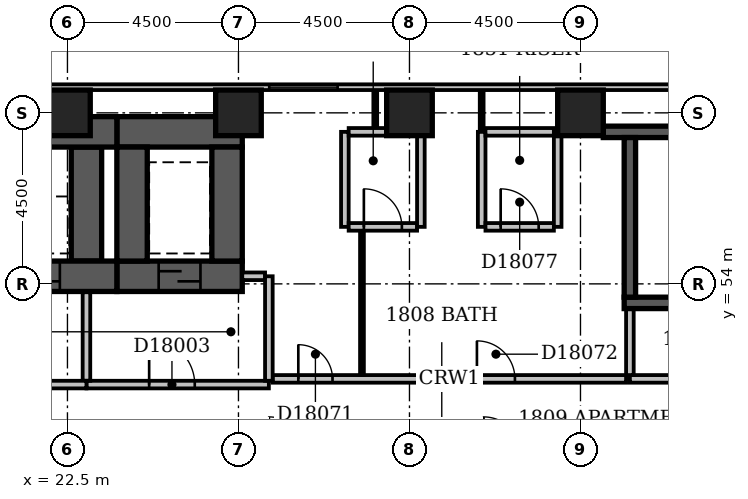
"""IFC4 building model, lengths in metres.
Left out: names, types, materials, properties, quantities, classifications, styles, units other than length and angle.
Written with IfcOpenShell. Run it as: python <this file> out.ifc"""

import sys

from ifc_helpers import new_model, si_unit, direction, frame, frame_2d, origin, origin_2d, place, context, subcontext, project, spatial, rectangle, extrude, element, fill, save


model = new_model("IFC4")
c1 = context("Model", 3, precision=1e-05, world=origin(), true_north=direction((0.0, 1.0)))
c2 = subcontext(c1, "Body", "Model", "MODEL_VIEW")
j1 = project(units=[si_unit("LENGTHUNIT", "METRE"), si_unit("PLANEANGLEUNIT", "RADIAN")], contexts=[c1])
p1 = place(None, origin())
s1 = spatial("IfcSite", under=j1, at=p1, CompositionType="ELEMENT")
p2 = place(p1, origin())
s2 = spatial("IfcBuilding", under=s1, at=p2, CompositionType="ELEMENT")
p3 = place(p2, frame((0.0, 0.0, 75.8)))
s3 = spatial("IfcBuildingStorey", under=s2, at=p3, CompositionType="ELEMENT", Elevation=75.8)
p4 = place(p3, frame((7.35, 54.2, -0.3), z_axis=(0.0, 0.0, 1.0), x_axis=(1.0, 0.0, 0.0)))
e1 = element("IfcWall", 1, at=p4, inside=s3, PredefinedType="SHEAR", context=c2, shape_type="SweptSolid", body=[
    extrude(rectangle(XDim=16.45, YDim=0.8, at=frame_2d((8.225, 0.0))), origin(), (0.0, 0.0, 1.0), 3.6),
])
p5 = place(p4, frame((1.35, 0.0, 0.3)))
e2 = element("IfcOpeningElement", 2, at=p5, cuts=e1, PredefinedType="OPENING", context=c2, shape_type="SweptSolid", body=[
    extrude(rectangle(XDim=1.1, YDim=2.1, at=frame_2d((0.55, 1.05))), frame((0.0, 0.412, 0.0), z_axis=(0.0, -1.0, 0.0), x_axis=(1.0, 0.0, 0.0)), (0.0, 0.0, 1.0), 0.824),
])
p6 = place(p4, frame((3.85, 0.0, 0.3)))
e3 = element("IfcOpeningElement", 3, at=p6, cuts=e1, PredefinedType="OPENING", context=c2, shape_type="SweptSolid", body=[
    extrude(rectangle(XDim=1.1, YDim=2.1, at=frame_2d((0.55, 1.05))), frame((0.0, 0.412, 0.0), z_axis=(0.0, -1.0, 0.0), x_axis=(1.0, 0.0, 0.0)), (0.0, 0.0, 1.0), 0.824),
])
p7 = place(p4, frame((6.35, 0.0, 0.3)))
e4 = element("IfcOpeningElement", 4, at=p7, cuts=e1, PredefinedType="OPENING", context=c2, shape_type="SweptSolid", body=[
    extrude(rectangle(XDim=1.1, YDim=2.1, at=frame_2d((0.55, 1.05))), frame((0.0, 0.412, 0.0), z_axis=(0.0, -1.0, 0.0), x_axis=(1.0, 0.0, 0.0)), (0.0, 0.0, 1.0), 0.824),
])
p8 = place(p4, frame((8.85, 0.0, 0.3)))
e5 = element("IfcOpeningElement", 5, at=p8, cuts=e1, PredefinedType="OPENING", context=c2, shape_type="SweptSolid", body=[
    extrude(rectangle(XDim=1.1, YDim=2.1, at=frame_2d((0.55, 1.05))), frame((0.0, 0.412, 0.0), z_axis=(0.0, -1.0, 0.0), x_axis=(1.0, 0.0, 0.0)), (0.0, 0.0, 1.0), 0.824),
])
p9 = place(p4, frame((11.35, 0.0, 0.3)))
e6 = element("IfcOpeningElement", 6, at=p9, cuts=e1, PredefinedType="OPENING", context=c2, shape_type="SweptSolid", body=[
    extrude(rectangle(XDim=1.1, YDim=2.1, at=frame_2d((0.55, 1.05))), frame((0.0, 0.412, 0.0), z_axis=(0.0, -1.0, 0.0), x_axis=(1.0, 0.0, 0.0)), (0.0, 0.0, 1.0), 0.824),
])
p10 = place(p4, frame((13.85, 0.0, 0.3)))
e7 = element("IfcOpeningElement", 7, at=p10, cuts=e1, PredefinedType="OPENING", context=c2, shape_type="SweptSolid", body=[
    extrude(rectangle(XDim=1.1, YDim=2.1, at=frame_2d((0.55, 1.05))), frame((0.0, 0.412, 0.0), z_axis=(0.0, -1.0, 0.0), x_axis=(1.0, 0.0, 0.0)), (0.0, 0.0, 1.0), 0.824),
])
p11 = place(p3, frame((7.35, 58.0, -0.3), z_axis=(0.0, 0.0, 1.0), x_axis=(1.0, 0.0, 0.0)))
e8 = element("IfcWall", 8, at=p11, inside=s3, PredefinedType="SHEAR", context=c2, shape_type="SweptSolid", body=[
    extrude(rectangle(XDim=16.45, YDim=0.8, at=frame_2d((8.225, 0.0))), origin(), (0.0, 0.0, 1.0), 3.6),
])
p12 = place(p3, frame((23.0, 54.6, -0.3), z_axis=(0.0, 0.0, 1.0), x_axis=(0.0, 1.0, 0.0)))
e9 = element("IfcWall", 9, at=p12, inside=s3, PredefinedType="SHEAR", context=c2, shape_type="SweptSolid", body=[
    extrude(rectangle(XDim=3.0, YDim=0.8, at=frame_2d((1.5, 0.0))), origin(), (0.0, 0.0, 1.0), 3.6),
])
p13 = place(p3, frame((23.8, 54.2, -0.3), z_axis=(0.0, 0.0, 1.0), x_axis=(1.0, 0.0, 0.0)))
e10 = element("IfcWall", 10, at=p13, inside=s3, PredefinedType="SHEAR", context=c2, shape_type="SweptSolid", body=[
    extrude(rectangle(XDim=3.3, YDim=0.8, at=frame_2d((1.65, 0.0))), origin(), (0.0, 0.0, 1.0), 3.6),
])
p14 = place(p13, frame((1.1, 0.0, 0.3)))
e11 = element("IfcOpeningElement", 11, at=p14, cuts=e10, PredefinedType="OPENING", context=c2, shape_type="SweptSolid", body=[
    extrude(rectangle(XDim=1.1, YDim=2.1, at=frame_2d((0.55, 1.05))), frame((0.0, 0.412, 0.0), z_axis=(0.0, -1.0, 0.0), x_axis=(1.0, 0.0, 0.0)), (0.0, 0.0, 1.0), 0.824),
])
p15 = place(p3, frame((23.8, 58.0, -0.3), z_axis=(0.0, 0.0, 1.0), x_axis=(1.0, 0.0, 0.0)))
e12 = element("IfcWall", 12, at=p15, inside=s3, PredefinedType="SHEAR", context=c2, shape_type="SweptSolid", body=[
    extrude(rectangle(XDim=3.3, YDim=0.8, at=frame_2d((1.65, 0.0))), origin(), (0.0, 0.0, 1.0), 3.6),
])
for number, where, z_axis, x_axis in (
    (13, (24.2, 54.6, -0.3), (0.0, 0.0, 1.0), (0.0, 1.0, 0.0)),
    (14, (26.7, 54.6, -0.3), (0.0, 0.0, 1.0), (0.0, 1.0, 0.0)),
):
    element("IfcWall", number, at=place(p3, frame(where, z_axis=z_axis, x_axis=x_axis)), inside=s3, PredefinedType="SHEAR", context=c2, shape_type="SweptSolid", body=[
        extrude(rectangle(XDim=3.0, YDim=0.8, at=frame_2d((1.5, 0.0))), origin(), (0.0, 0.0, 1.0), 3.6),
    ])
p16 = place(p3, frame((36.6, 58.0, -0.3), z_axis=(0.0, 0.0, 1.0), x_axis=(1.0, 0.0, 0.0)))
e15 = element("IfcWall", 15, at=p16, inside=s3, PredefinedType="SHEAR", context=c2, shape_type="SweptSolid", body=[
    extrude(rectangle(XDim=7.8, YDim=0.3, at=frame_2d((3.9, 0.0))), origin(), (0.0, 0.0, 1.0), 3.6),
])
p17 = place(p3, frame((37.15, 53.5, -0.3), z_axis=(0.0, 0.0, 1.0), x_axis=(1.0, 0.0, 0.0)))
e16 = element("IfcWall", 16, at=p17, inside=s3, PredefinedType="SHEAR", context=c2, shape_type="SweptSolid", body=[
    extrude(rectangle(XDim=7.0, YDim=0.3, at=frame_2d((3.5, 0.0))), origin(), (0.0, 0.0, 1.0), 3.6),
])
p18 = place(p17, frame((5.58, 0.0, 0.3)))
e17 = element("IfcOpeningElement", 17, at=p18, cuts=e16, PredefinedType="OPENING", context=c2, shape_type="SweptSolid", body=[
    extrude(rectangle(XDim=1.1, YDim=2.1, at=frame_2d((0.55, 1.05))), frame((0.0, 0.162, 0.0), z_axis=(0.0, -1.0, 0.0), x_axis=(1.0, 0.0, 0.0)), (0.0, 0.0, 1.0), 0.324),
])
p19 = place(p3, frame((37.3, 53.65, -0.3), z_axis=(0.0, 0.0, 1.0), x_axis=(0.0, 1.0, 0.0)))
e18 = element("IfcWall", 18, at=p19, inside=s3, PredefinedType="SHEAR", context=c2, shape_type="SweptSolid", body=[
    extrude(rectangle(XDim=4.2, YDim=0.3, at=frame_2d((2.1, 0.0))), origin(), (0.0, 0.0, 1.0), 3.6),
])
for number, where, z_axis, x_axis in (
    (19, (22.5, 58.5, -0.3), (0.0, 0.0, 1.0), (1.0, 0.0, 0.0)),
    (20, (27.0, 58.5, -0.3), (0.0, 0.0, 1.0), (1.0, 0.0, 0.0)),
    (21, (31.5, 58.5, -0.3), (0.0, 0.0, 1.0), (1.0, 0.0, 0.0)),
    (22, (36.0, 58.5, -0.3), (0.0, 0.0, 1.0), (1.0, 0.0, 0.0)),
):
    element("IfcColumn", number, at=place(p3, frame(where, z_axis=z_axis, x_axis=x_axis)), inside=s3, PredefinedType="COLUMN", context=c2, shape_type="SweptSolid", body=[
        extrude(rectangle(XDim=1.2, YDim=1.2, at=origin_2d()), origin(), (0.0, 0.0, 1.0), 3.6),
    ])
p20 = place(p3, frame((68.1, 59.175, 0.0), z_axis=(0.0, 0.0, 1.0), x_axis=(-1.0, 0.0, 0.0)))
e23 = element("IfcWall", 23, at=p20, inside=s3, PredefinedType="STANDARD", context=c2, shape_type="SweptSolid", body=[
    extrude(rectangle(XDim=68.85, YDim=0.15, at=frame_2d((34.425, 0.0))), origin(), (0.0, 0.0, 1.0), 2.7),
])
p21 = place(p20, frame((1.65, 0.0, 0.6)))
e24 = element("IfcOpeningElement", 24, at=p21, cuts=e23, PredefinedType="OPENING", context=c2, shape_type="SweptSolid", body=[
    extrude(rectangle(XDim=2.4, YDim=1.8, at=frame_2d((1.2, 0.9))), frame((0.0, 0.087, 0.0), z_axis=(0.0, -1.0, 0.0), x_axis=(1.0, 0.0, 0.0)), (0.0, 0.0, 1.0), 0.174),
])
p22 = place(p20, frame((6.15, 0.0, 0.6)))
e25 = element("IfcOpeningElement", 25, at=p22, cuts=e23, PredefinedType="OPENING", context=c2, shape_type="SweptSolid", body=[
    extrude(rectangle(XDim=2.4, YDim=1.8, at=frame_2d((1.2, 0.9))), frame((0.0, 0.087, 0.0), z_axis=(0.0, -1.0, 0.0), x_axis=(1.0, 0.0, 0.0)), (0.0, 0.0, 1.0), 0.174),
])
p23 = place(p20, frame((38.49, 0.0, 0.6)))
e26 = element("IfcOpeningElement", 26, at=p23, cuts=e23, PredefinedType="OPENING", context=c2, shape_type="SweptSolid", body=[
    extrude(rectangle(XDim=1.8, YDim=1.8, at=frame_2d((0.9, 0.9))), frame((0.0, 0.087, 0.0), z_axis=(0.0, -1.0, 0.0), x_axis=(1.0, 0.0, 0.0)), (0.0, 0.0, 1.0), 0.174),
])
p24 = place(p3, frame((8.0, 51.35, 0.0), z_axis=(0.0, 0.0, 1.0), x_axis=(1.0, 0.0, 0.0)))
e27 = element("IfcWall", 27, at=p24, inside=s3, PredefinedType="PARTITIONING", context=c2, shape_type="SweptSolid", body=[
    extrude(rectangle(XDim=15.0, YDim=0.2, at=frame_2d((7.5, 0.0))), origin(), (0.0, 0.0, 1.0), 3.3),
])
p25 = place(p24, frame((3.4, 0.0, 0.0)))
e28 = element("IfcOpeningElement", 28, at=p25, cuts=e27, PredefinedType="OPENING", context=c2, shape_type="SweptSolid", body=[
    extrude(rectangle(XDim=1.2, YDim=2.1, at=frame_2d((0.6, 1.05))), frame((0.0, 0.112, 0.0), z_axis=(0.0, -1.0, 0.0), x_axis=(1.0, 0.0, 0.0)), (0.0, 0.0, 1.0), 0.224),
])
p26 = place(p24, frame((9.4, 0.0, 0.0)))
e29 = element("IfcOpeningElement", 29, at=p26, cuts=e27, PredefinedType="OPENING", context=c2, shape_type="SweptSolid", body=[
    extrude(rectangle(XDim=1.2, YDim=2.1, at=frame_2d((0.6, 1.05))), frame((0.0, 0.112, 0.0), z_axis=(0.0, -1.0, 0.0), x_axis=(1.0, 0.0, 0.0)), (0.0, 0.0, 1.0), 0.224),
])
p27 = place(p3, frame((23.0, 51.45, 0.0), z_axis=(0.0, 0.0, 1.0), x_axis=(0.0, 1.0, 0.0)))
e30 = element("IfcWall", 30, at=p27, inside=s3, PredefinedType="PARTITIONING", context=c2, shape_type="SweptSolid", body=[
    extrude(rectangle(XDim=2.33, YDim=0.2, at=frame_2d((1.165, 0.0))), origin(), (0.0, 0.0, 1.0), 3.3),
])
p28 = place(p3, frame((23.0, 51.35, 0.0), z_axis=(0.0, 0.0, 1.0), x_axis=(1.0, 0.0, 0.0)))
e31 = element("IfcWall", 31, at=p28, inside=s3, PredefinedType="PARTITIONING", context=c2, shape_type="SweptSolid", body=[
    extrude(rectangle(XDim=4.8, YDim=0.2, at=frame_2d((2.4, 0.0))), origin(), (0.0, 0.0, 1.0), 3.3),
])
p29 = place(p28, frame((1.65, 0.0, 0.0)))
e32 = element("IfcOpeningElement", 32, at=p29, cuts=e31, PredefinedType="OPENING", context=c2, shape_type="SweptSolid", body=[
    extrude(rectangle(XDim=1.2, YDim=2.1, at=frame_2d((0.6, 1.05))), frame((0.0, 0.112, 0.0), z_axis=(0.0, -1.0, 0.0), x_axis=(1.0, 0.0, 0.0)), (0.0, 0.0, 1.0), 0.224),
])
p30 = place(p3, frame((27.8, 51.45, 0.0), z_axis=(0.0, 0.0, 1.0), x_axis=(0.0, 1.0, 0.0)))
e33 = element("IfcWall", 33, at=p30, inside=s3, PredefinedType="PARTITIONING", context=c2, shape_type="SweptSolid", body=[
    extrude(rectangle(XDim=2.75, YDim=0.2, at=frame_2d((1.375, 0.0))), origin(), (0.0, 0.0, 1.0), 3.3),
])
p31 = place(p3, frame((27.1, 54.2, 0.0), z_axis=(0.0, 0.0, 1.0), x_axis=(1.0, 0.0, 0.0)))
e34 = element("IfcWall", 34, at=p31, inside=s3, PredefinedType="PARTITIONING", context=c2, shape_type="SweptSolid", body=[
    extrude(rectangle(XDim=0.6, YDim=0.2, at=frame_2d((0.3, 0.0))), origin(), (0.0, 0.0, 1.0), 3.3),
])
p32 = place(p3, frame((37.3, 51.5, 0.0), z_axis=(0.0, 0.0, 1.0), x_axis=(1.0, 0.0, 0.0)))
e35 = element("IfcWall", 35, at=p32, inside=s3, PredefinedType="PARTITIONING", context=c2, shape_type="SweptSolid", body=[
    extrude(rectangle(XDim=6.7, YDim=0.2, at=frame_2d((3.35, 0.0))), origin(), (0.0, 0.0, 1.0), 3.3),
])
p33 = place(p32, frame((2.75, 0.0, 0.0)))
e36 = element("IfcOpeningElement", 36, at=p33, cuts=e35, PredefinedType="OPENING", context=c2, shape_type="SweptSolid", body=[
    extrude(rectangle(XDim=1.2, YDim=2.1, at=frame_2d((0.6, 1.05))), frame((0.0, 0.112, 0.0), z_axis=(0.0, -1.0, 0.0), x_axis=(1.0, 0.0, 0.0)), (0.0, 0.0, 1.0), 0.224),
])
p34 = place(p3, frame((37.3, 51.6, 0.0), z_axis=(0.0, 0.0, 1.0), x_axis=(0.0, 1.0, 0.0)))
e37 = element("IfcWall", 37, at=p34, inside=s3, PredefinedType="PARTITIONING", context=c2, shape_type="SweptSolid", body=[
    extrude(rectangle(XDim=1.73, YDim=0.2, at=frame_2d((0.865, 0.0))), origin(), (0.0, 0.0, 1.0), 3.3),
])
p35 = place(p3, frame((27.9, 51.5, 0.0), z_axis=(0.0, 0.0, 1.0), x_axis=(1.0, 0.0, 0.0)))
e38 = element("IfcWall", 38, at=p35, inside=s3, PredefinedType="PARTITIONING", context=c2, shape_type="SweptSolid", body=[
    extrude(rectangle(XDim=9.3, YDim=0.2, at=frame_2d((4.65, 0.0))), origin(), (0.0, 0.0, 1.0), 3.3),
])
p36 = place(p35, frame((0.675, 0.0, 0.0)))
e39 = element("IfcOpeningElement", 39, at=p36, cuts=e38, PredefinedType="OPENING", context=c2, shape_type="SweptSolid", body=[
    extrude(rectangle(XDim=0.9, YDim=2.1, at=frame_2d((0.45, 1.05))), frame((0.0, 0.112, 0.0), z_axis=(0.0, -1.0, 0.0), x_axis=(1.0, 0.0, 0.0)), (0.0, 0.0, 1.0), 0.224),
])
p37 = place(p35, frame((5.375, 0.0, 0.0)))
e40 = element("IfcOpeningElement", 40, at=p37, cuts=e38, PredefinedType="OPENING", context=c2, shape_type="SweptSolid", body=[
    extrude(rectangle(XDim=1.0, YDim=2.1, at=frame_2d((0.5, 1.05))), frame((0.0, 0.112, 0.0), z_axis=(0.0, -1.0, 0.0), x_axis=(1.0, 0.0, 0.0)), (0.0, 0.0, 1.0), 0.224),
])
p38 = place(p3, frame((30.25, 51.6, 0.0), z_axis=(0.0, 0.0, 1.0), x_axis=(0.0, 1.0, 0.0)))
e41 = element("IfcWall", 41, at=p38, inside=s3, PredefinedType="PARTITIONING", context=c2, shape_type="SweptSolid", body=[
    extrude(rectangle(XDim=3.8, YDim=0.1, at=frame_2d((1.9, 0.0))), origin(), (0.0, 0.0, 1.0), 3.3),
])
p39 = place(p3, frame((29.8, 55.5, 0.0), z_axis=(0.0, 0.0, 1.0), x_axis=(0.0, 1.0, 0.0)))
e42 = element("IfcWall", 42, at=p39, inside=s3, PredefinedType="PARTITIONING", context=c2, shape_type="SweptSolid", body=[
    extrude(rectangle(XDim=2.5, YDim=0.2, at=frame_2d((1.25, 0.0))), origin(), (0.0, 0.0, 1.0), 3.3),
])
p40 = place(p3, frame((29.9, 55.5, 0.0), z_axis=(0.0, 0.0, 1.0), x_axis=(1.0, 0.0, 0.0)))
e43 = element("IfcWall", 43, at=p40, inside=s3, PredefinedType="PARTITIONING", context=c2, shape_type="SweptSolid", body=[
    extrude(rectangle(XDim=1.8, YDim=0.2, at=frame_2d((0.9, 0.0))), origin(), (0.0, 0.0, 1.0), 3.3),
])
p41 = place(p40, frame((0.4, 0.0, 0.0)))
e44 = element("IfcOpeningElement", 44, at=p41, cuts=e43, PredefinedType="OPENING", context=c2, shape_type="SweptSolid", body=[
    extrude(rectangle(XDim=1.0, YDim=2.1, at=frame_2d((0.5, 1.05))), frame((0.0, 0.112, 0.0), z_axis=(0.0, -1.0, 0.0), x_axis=(1.0, 0.0, 0.0)), (0.0, 0.0, 1.0), 0.224),
])
for number, where, z_axis, x_axis in (
    (45, (31.8, 55.5, 0.0), (0.0, 0.0, 1.0), (0.0, 1.0, 0.0)),
    (46, (33.4, 55.5, 0.0), (0.0, 0.0, 1.0), (0.0, 1.0, 0.0)),
):
    element("IfcWall", number, at=place(p3, frame(where, z_axis=z_axis, x_axis=x_axis)), inside=s3, PredefinedType="PARTITIONING", context=c2, shape_type="SweptSolid", body=[
        extrude(rectangle(XDim=2.5, YDim=0.2, at=frame_2d((1.25, 0.0))), origin(), (0.0, 0.0, 1.0), 3.3),
    ])
p42 = place(p3, frame((33.5, 55.5, 0.0), z_axis=(0.0, 0.0, 1.0), x_axis=(1.0, 0.0, 0.0)))
e47 = element("IfcWall", 47, at=p42, inside=s3, PredefinedType="PARTITIONING", context=c2, shape_type="SweptSolid", body=[
    extrude(rectangle(XDim=1.8, YDim=0.2, at=frame_2d((0.9, 0.0))), origin(), (0.0, 0.0, 1.0), 3.3),
])
p43 = place(p42, frame((0.4, 0.0, 0.0)))
e48 = element("IfcOpeningElement", 48, at=p43, cuts=e47, PredefinedType="OPENING", context=c2, shape_type="SweptSolid", body=[
    extrude(rectangle(XDim=1.0, YDim=2.1, at=frame_2d((0.5, 1.05))), frame((0.0, 0.112, 0.0), z_axis=(0.0, -1.0, 0.0), x_axis=(1.0, 0.0, 0.0)), (0.0, 0.0, 1.0), 0.224),
])
p44 = place(p3, frame((35.4, 55.5, 0.0), z_axis=(0.0, 0.0, 1.0), x_axis=(0.0, 1.0, 0.0)))
e49 = element("IfcWall", 49, at=p44, inside=s3, PredefinedType="PARTITIONING", context=c2, shape_type="SweptSolid", body=[
    extrude(rectangle(XDim=2.5, YDim=0.2, at=frame_2d((1.25, 0.0))), origin(), (0.0, 0.0, 1.0), 2.4),
])
p45 = place(p3, frame((29.9, 58.0, 0.0), z_axis=(0.0, 0.0, 1.0), x_axis=(1.0, 0.0, 0.0)))
e50 = element("IfcWall", 50, at=p45, inside=s3, PredefinedType="PARTITIONING", context=c2, shape_type="SweptSolid", body=[
    extrude(rectangle(XDim=1.8, YDim=0.2, at=frame_2d((0.9, 0.0))), origin(), (0.0, 0.0, 1.0), 3.3),
])
p46 = place(p3, frame((33.4, 58.0, 0.0), z_axis=(0.0, 0.0, 1.0), x_axis=(0.0, 1.0, 0.0)))
e51 = element("IfcWall", 51, at=p46, inside=s3, PredefinedType="PARTITIONING", context=c2, shape_type="SweptSolid", body=[
    extrude(rectangle(XDim=1.1, YDim=0.1, at=frame_2d((0.55, 0.0))), origin(), (0.0, 0.0, 1.0), 3.3),
])
p47 = place(p3, frame((33.5, 58.0, 0.0), z_axis=(0.0, 0.0, 1.0), x_axis=(1.0, 0.0, 0.0)))
e52 = element("IfcWall", 52, at=p47, inside=s3, PredefinedType="PARTITIONING", context=c2, shape_type="SweptSolid", body=[
    extrude(rectangle(XDim=1.8, YDim=0.2, at=frame_2d((0.9, 0.0))), origin(), (0.0, 0.0, 1.0), 3.3),
])
p48 = place(p3, frame((30.6, 58.1, 0.0), z_axis=(0.0, 0.0, 1.0), x_axis=(0.0, 1.0, 0.0)))
e53 = element("IfcWall", 53, at=p48, inside=s3, PredefinedType="PARTITIONING", context=c2, shape_type="SweptSolid", body=[
    extrude(rectangle(XDim=1.0, YDim=0.1, at=frame_2d((0.5, 0.0))), origin(), (0.0, 0.0, 1.0), 3.3),
])
p49 = place(p23, origin())
e54 = element("IfcWindow", 54, at=p49, inside=s3, PartitioningType="SINGLE_PANEL", PredefinedType="WINDOW", context=c2, shape_type="SweptSolid", body=[
    extrude(rectangle(XDim=1.8, YDim=1.8, at=frame_2d((0.9, 0.9))), frame((0.0, 0.03, 0.0), z_axis=(0.0, -1.0, 0.0), x_axis=(1.0, 0.0, 0.0)), (0.0, 0.0, 1.0), 0.06),
])
fill(e26, e54)
p50 = place(p29, origin())
e55 = element("IfcDoor", 55, at=p50, inside=s3, OperationType="SINGLE_SWING_LEFT", PredefinedType="DOOR", context=c2, shape_type="SweptSolid", body=[
    extrude(rectangle(XDim=1.2, YDim=2.1, at=frame_2d((0.6, 1.05))), frame((0.0, 0.025, 0.0), z_axis=(0.0, -1.0, 0.0), x_axis=(1.0, 0.0, 0.0)), (0.0, 0.0, 1.0), 0.05),
])
fill(e32, e55)
p51 = place(p14, origin())
e56 = element("IfcDoor", 56, at=p51, inside=s3, OperationType="SLIDING_TO_LEFT", PredefinedType="DOOR", context=c2, shape_type="SweptSolid", body=[
    extrude(rectangle(XDim=1.1, YDim=2.1, at=frame_2d((0.55, 1.05))), frame((0.0, 0.025, 0.0), z_axis=(0.0, -1.0, 0.0), x_axis=(1.0, 0.0, 0.0)), (0.0, 0.0, 1.0), 0.05),
])
fill(e11, e56)
p52 = place(p10, origin())
e57 = element("IfcDoor", 57, at=p52, inside=s3, OperationType="SLIDING_TO_LEFT", PredefinedType="DOOR", context=c2, shape_type="SweptSolid", body=[
    extrude(rectangle(XDim=1.1, YDim=2.1, at=frame_2d((0.55, 1.05))), frame((0.0, 0.025, 0.0), z_axis=(0.0, -1.0, 0.0), x_axis=(1.0, 0.0, 0.0)), (0.0, 0.0, 1.0), 0.05),
])
fill(e7, e57)
p53 = place(p36, origin())
e58 = element("IfcDoor", 58, at=p53, inside=s3, OperationType="SINGLE_SWING_LEFT", PredefinedType="DOOR", context=c2, shape_type="SweptSolid", body=[
    extrude(rectangle(XDim=0.9, YDim=2.1, at=frame_2d((0.45, 1.05))), frame((0.0, 0.025, 0.0), z_axis=(0.0, -1.0, 0.0), x_axis=(1.0, 0.0, 0.0)), (0.0, 0.0, 1.0), 0.05),
])
fill(e39, e58)
p54 = place(p37, origin())
e59 = element("IfcDoor", 59, at=p54, inside=s3, OperationType="SINGLE_SWING_LEFT", PredefinedType="DOOR", context=c2, shape_type="SweptSolid", body=[
    extrude(rectangle(XDim=1.0, YDim=2.1, at=frame_2d((0.5, 1.05))), frame((0.0, 0.025, 0.0), z_axis=(0.0, -1.0, 0.0), x_axis=(1.0, 0.0, 0.0)), (0.0, 0.0, 1.0), 0.05),
])
fill(e40, e59)
p55 = place(p41, origin())
e60 = element("IfcDoor", 60, at=p55, inside=s3, OperationType="SINGLE_SWING_LEFT", PredefinedType="DOOR", context=c2, shape_type="SweptSolid", body=[
    extrude(rectangle(XDim=1.0, YDim=2.1, at=frame_2d((0.5, 1.05))), frame((0.0, 0.025, 0.0), z_axis=(0.0, -1.0, 0.0), x_axis=(1.0, 0.0, 0.0)), (0.0, 0.0, 1.0), 0.05),
])
fill(e44, e60)
p56 = place(p43, origin())
e61 = element("IfcDoor", 61, at=p56, inside=s3, OperationType="SINGLE_SWING_LEFT", PredefinedType="DOOR", context=c2, shape_type="SweptSolid", body=[
    extrude(rectangle(XDim=1.0, YDim=2.1, at=frame_2d((0.5, 1.05))), frame((0.0, 0.025, 0.0), z_axis=(0.0, -1.0, 0.0), x_axis=(1.0, 0.0, 0.0)), (0.0, 0.0, 1.0), 0.05),
])
fill(e48, e61)
save(model, sys.argv[1])
